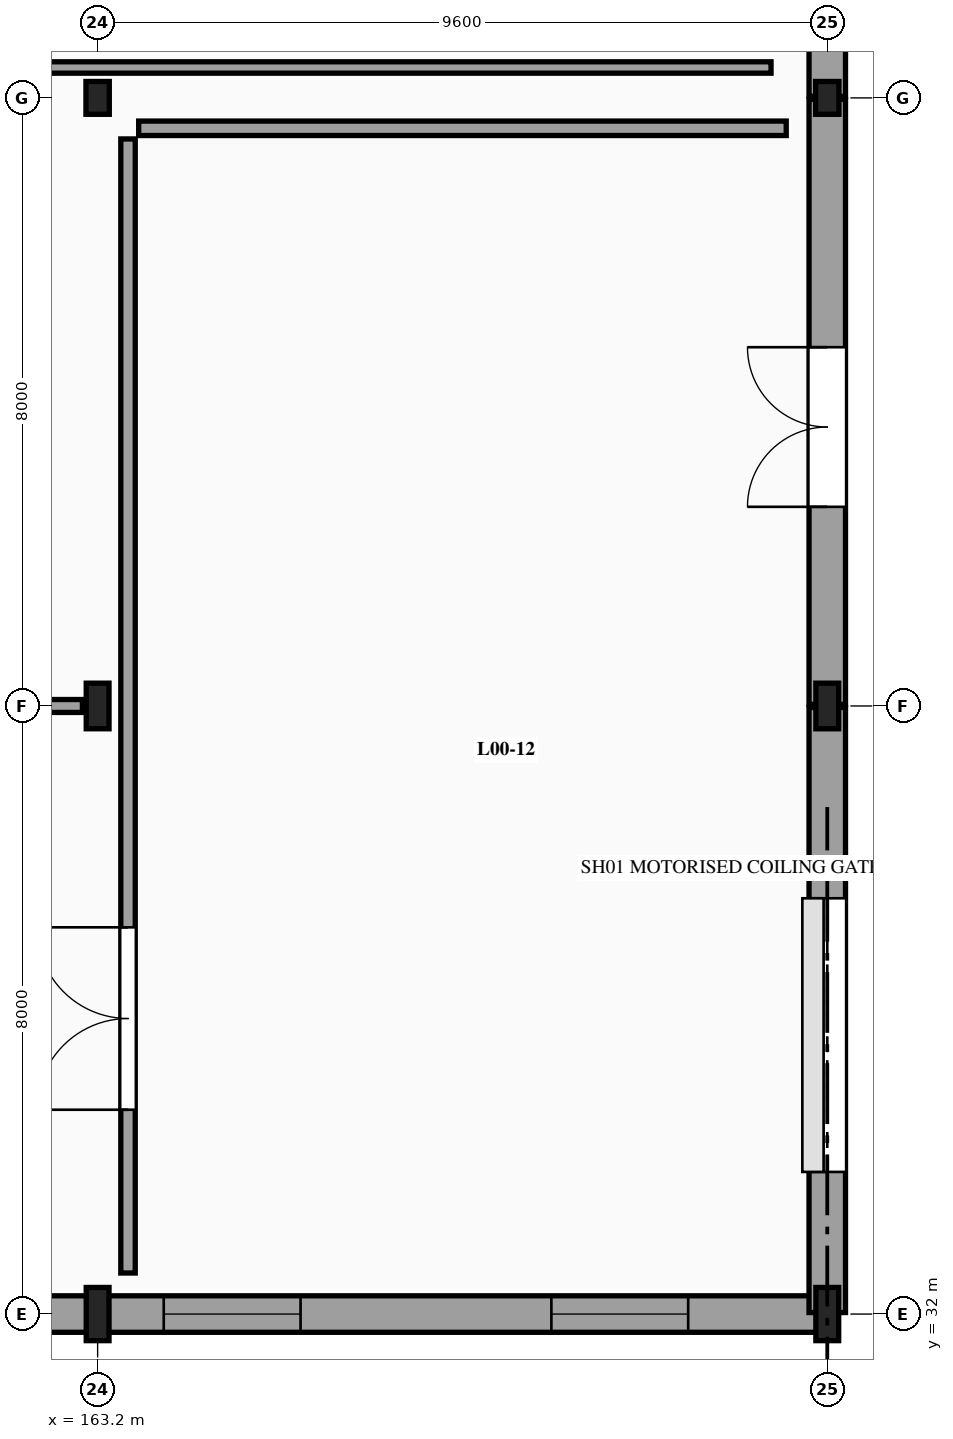
"""IFC4 building model, lengths in metres.
Left out: names, types, materials, properties, quantities, classifications, styles, units other than length and angle.
Written with IfcOpenShell. Run it as: python <this file> out.ifc"""

import sys

from ifc_helpers import new_model, si_unit, direction, frame, frame_2d, origin, origin_2d, place, context, subcontext, project, spatial, rectangle, i_section, extrude, element, fill, save


model = new_model("IFC4")
c1 = context("Model", 3, precision=1e-05, world=origin(), true_north=direction((0.0, 1.0)))
c2 = subcontext(c1, "Body", "Model", "MODEL_VIEW")
j1 = project(units=[si_unit("LENGTHUNIT", "METRE"), si_unit("PLANEANGLEUNIT", "RADIAN")], contexts=[c1])
p1 = place(None, origin())
s1 = spatial("IfcSite", under=j1, at=p1, CompositionType="ELEMENT")
p2 = place(p1, origin())
s2 = spatial("IfcBuilding", under=s1, at=p2, CompositionType="ELEMENT")
p3 = place(p2, origin())
s3 = spatial("IfcBuildingStorey", under=s2, at=p3, CompositionType="ELEMENT", Elevation=0.0)
p4 = place(p3, frame((163.2, 32.0, -0.28), z_axis=(0.0, 0.0, 1.0), x_axis=(1.0, 0.0, 0.0)))
e1 = element("IfcColumn", 1, at=p4, inside=s3, PredefinedType="COLUMN", context=c2, shape_type="SweptSolid", body=[
    extrude(i_section(OverallWidth=0.3, OverallDepth=0.7, WebThickness=0.017, FlangeThickness=0.032, FilletRadius=0.027, at=origin_2d()), origin(), (0.0, 0.0, 1.0), 4.52),
])
p5 = place(p3, frame((163.2, 40.0, -0.28), z_axis=(0.0, 0.0, 1.0), x_axis=(1.0, 0.0, 0.0)))
e2 = element("IfcColumn", 2, at=p5, inside=s3, PredefinedType="COLUMN", context=c2, shape_type="SweptSolid", body=[
    extrude(i_section(OverallWidth=0.3, OverallDepth=0.6, WebThickness=0.015, FlangeThickness=0.03, FilletRadius=0.027, at=origin_2d()), origin(), (0.0, 0.0, 1.0), 4.52),
])
p6 = place(p3, frame((163.2, 48.0, -0.28), z_axis=(0.0, 0.0, 1.0), x_axis=(1.0, 0.0, 0.0)))
e3 = element("IfcColumn", 3, at=p6, inside=s3, PredefinedType="COLUMN", context=c2, shape_type="SweptSolid", body=[
    extrude(i_section(OverallWidth=0.307, OverallDepth=0.432, WebThickness=0.021, FlangeThickness=0.04, FilletRadius=0.027, at=origin_2d()), origin(), (0.0, 0.0, 1.0), 4.52),
])
p7 = place(p3, frame((172.8, 32.0, -0.28), z_axis=(0.0, 0.0, 1.0), x_axis=(1.0, 0.0, 0.0)))
e4 = element("IfcColumn", 4, at=p7, inside=s3, PredefinedType="COLUMN", context=c2, shape_type="SweptSolid", body=[
    extrude(i_section(OverallWidth=0.3, OverallDepth=0.7, WebThickness=0.017, FlangeThickness=0.032, FilletRadius=0.027, at=origin_2d()), origin(), (0.0, 0.0, 1.0), 4.52),
])
p8 = place(p3, frame((172.8, 40.0, -0.28), z_axis=(0.0, 0.0, 1.0), x_axis=(1.0, 0.0, 0.0)))
e5 = element("IfcColumn", 5, at=p8, inside=s3, PredefinedType="COLUMN", context=c2, shape_type="SweptSolid", body=[
    extrude(i_section(OverallWidth=0.3, OverallDepth=0.6, WebThickness=0.015, FlangeThickness=0.03, FilletRadius=0.027, at=origin_2d()), origin(), (0.0, 0.0, 1.0), 4.52),
])
p9 = place(p3, frame((172.8, 48.0, -0.28), z_axis=(0.0, 0.0, 1.0), x_axis=(1.0, 0.0, 0.0)))
e6 = element("IfcColumn", 6, at=p9, inside=s3, PredefinedType="COLUMN", context=c2, shape_type="SweptSolid", body=[
    extrude(i_section(OverallWidth=0.307, OverallDepth=0.432, WebThickness=0.021, FlangeThickness=0.04, FilletRadius=0.027, at=origin_2d()), origin(), (0.0, 0.0, 1.0), 4.52),
])
p10 = place(p3, frame((153.62, 32.0, 0.0), z_axis=(0.0, 0.0, 1.0), x_axis=(1.0, 0.0, 0.0)))
e7 = element("IfcWall", 7, at=p10, inside=s3, PredefinedType="SOLIDWALL", context=c2, shape_type="SweptSolid", body=[
    extrude(rectangle(XDim=9.56, YDim=0.48, at=frame_2d((4.78, 0.0))), origin(), (0.0, 0.0, 1.0), 3.56),
])
p11 = place(p10, frame((0.85, 0.0, 0.85)))
e8 = element("IfcOpeningElement", 8, at=p11, cuts=e7, PredefinedType="OPENING", context=c2, shape_type="SweptSolid", body=[
    extrude(rectangle(XDim=1.6, YDim=2.0, at=frame_2d((0.8, 1.0))), frame((0.0, 0.25, 0.0), z_axis=(0.0, -1.0, 0.0), x_axis=(1.0, 0.0, 0.0)), (0.0, 0.0, 1.0), 0.5),
])
p12 = place(p10, frame((5.95, 0.0, 0.85)))
e9 = element("IfcOpeningElement", 9, at=p12, cuts=e7, PredefinedType="OPENING", context=c2, shape_type="SweptSolid", body=[
    extrude(rectangle(XDim=1.6, YDim=2.0, at=frame_2d((0.8, 1.0))), frame((0.0, 0.25, 0.0), z_axis=(0.0, -1.0, 0.0), x_axis=(1.0, 0.0, 0.0)), (0.0, 0.0, 1.0), 0.5),
])
p13 = place(p3, frame((163.22, 32.0, 0.0), z_axis=(0.0, 0.0, 1.0), x_axis=(1.0, 0.0, 0.0)))
e10 = element("IfcWall", 10, at=p13, inside=s3, PredefinedType="SOLIDWALL", context=c2, shape_type="SweptSolid", body=[
    extrude(rectangle(XDim=9.56, YDim=0.48, at=frame_2d((4.78, 0.0))), origin(), (0.0, 0.0, 1.0), 3.56),
])
p14 = place(p13, frame((0.85, 0.0, 0.85)))
e11 = element("IfcOpeningElement", 11, at=p14, cuts=e10, PredefinedType="OPENING", context=c2, shape_type="SweptSolid", body=[
    extrude(rectangle(XDim=1.8, YDim=2.4, at=frame_2d((0.9, 1.2))), frame((0.0, 0.25, 0.0), z_axis=(0.0, -1.0, 0.0), x_axis=(1.0, 0.0, 0.0)), (0.0, 0.0, 1.0), 0.5),
])
p15 = place(p13, frame((5.95, 0.0, 0.85)))
e12 = element("IfcOpeningElement", 12, at=p15, cuts=e10, PredefinedType="OPENING", context=c2, shape_type="SweptSolid", body=[
    extrude(rectangle(XDim=1.8, YDim=2.4, at=frame_2d((0.9, 1.2))), frame((0.0, 0.25, 0.0), z_axis=(0.0, -1.0, 0.0), x_axis=(1.0, 0.0, 0.0)), (0.0, 0.0, 1.0), 0.5),
])
p16 = place(p3, frame((172.8, 32.02, 0.0), z_axis=(0.0, 0.0, 1.0), x_axis=(0.0, 1.0, 0.0)))
e13 = element("IfcWall", 13, at=p16, inside=s3, PredefinedType="SOLIDWALL", context=c2, shape_type="SweptSolid", body=[
    extrude(rectangle(XDim=7.96, YDim=0.48, at=frame_2d((3.98, 0.0))), origin(), (0.0, 0.0, 1.0), 3.56),
])
p17 = place(p16, frame((1.85, 0.0, 0.0)))
e14 = element("IfcOpeningElement", 14, at=p17, cuts=e13, PredefinedType="OPENING", context=c2, shape_type="SweptSolid", body=[
    extrude(rectangle(XDim=3.6, YDim=3.2, at=frame_2d((1.8, 1.6))), frame((0.0, 0.25, 0.0), z_axis=(0.0, -1.0, 0.0), x_axis=(1.0, 0.0, 0.0)), (0.0, 0.0, 1.0), 0.5),
])
p18 = place(p3, frame((172.8, 40.02, 0.0), z_axis=(0.0, 0.0, 1.0), x_axis=(0.0, 1.0, 0.0)))
e15 = element("IfcWall", 15, at=p18, inside=s3, PredefinedType="SOLIDWALL", context=c2, shape_type="SweptSolid", body=[
    extrude(rectangle(XDim=7.96, YDim=0.48, at=frame_2d((3.98, 0.0))), origin(), (0.0, 0.0, 1.0), 3.56),
])
p19 = place(p18, frame((2.6, 0.0, 0.0)))
e16 = element("IfcOpeningElement", 16, at=p19, cuts=e15, PredefinedType="OPENING", context=c2, shape_type="SweptSolid", body=[
    extrude(rectangle(XDim=2.1, YDim=2.4, at=frame_2d((1.05, 1.2))), frame((0.0, 0.25, 0.0), z_axis=(0.0, -1.0, 0.0), x_axis=(1.0, 0.0, 0.0)), (0.0, 0.0, 1.0), 0.5),
])
p20 = place(p3, frame((172.8, 48.02, 0.0), z_axis=(0.0, 0.0, 1.0), x_axis=(0.0, 1.0, 0.0)))
e17 = element("IfcWall", 17, at=p20, inside=s3, PredefinedType="SOLIDWALL", context=c2, shape_type="SweptSolid", body=[
    extrude(rectangle(XDim=7.96, YDim=0.48, at=frame_2d((3.98, 0.0))), origin(), (0.0, 0.0, 1.0), 3.56),
])
p21 = place(p20, frame((4.9, 0.0, 0.9)))
e18 = element("IfcOpeningElement", 18, at=p21, cuts=e17, PredefinedType="OPENING", context=c2, shape_type="SweptSolid", body=[
    extrude(rectangle(XDim=1.2, YDim=1.8, at=frame_2d((0.6, 0.9))), frame((0.0, 0.25, 0.0), z_axis=(0.0, -1.0, 0.0), x_axis=(1.0, 0.0, 0.0)), (0.0, 0.0, 1.0), 0.5),
])
p22 = place(p3, frame((144.0, 40.0, 0.0), z_axis=(0.0, 0.0, 1.0), x_axis=(1.0, 0.0, 0.0)))
e19 = element("IfcWall", 19, at=p22, inside=s3, PredefinedType="SOLIDWALL", context=c2, shape_type="SweptSolid", body=[
    extrude(rectangle(XDim=19.0, YDim=0.17, at=frame_2d((9.5, 0.0))), origin(), (0.0, 0.0, 1.0), 3.6),
])
p23 = place(p22, frame((3.8, 0.0, 0.0)))
e20 = element("IfcOpeningElement", 20, at=p23, cuts=e19, PredefinedType="OPENING", context=c2, shape_type="SweptSolid", body=[
    extrude(rectangle(XDim=1.6, YDim=2.25, at=frame_2d((0.8, 1.125))), frame((0.0, 0.095, 0.0), z_axis=(0.0, -1.0, 0.0), x_axis=(1.0, 0.0, 0.0)), (0.0, 0.0, 1.0), 0.19),
])
p24 = place(p3, frame((163.74, 47.6, 0.0), z_axis=(0.0, 0.0, 1.0), x_axis=(1.0, 0.0, 0.0)))
e21 = element("IfcWall", 21, at=p24, inside=s3, PredefinedType="SOLIDWALL", context=c2, shape_type="SweptSolid", body=[
    extrude(rectangle(XDim=8.52, YDim=0.19, at=frame_2d((4.26, 0.0))), origin(), (0.0, 0.0, 1.0), 3.6),
])
p25 = place(p3, frame((163.6, 32.54, 0.0), z_axis=(0.0, 0.0, 1.0), x_axis=(0.0, 1.0, 0.0)))
e22 = element("IfcWall", 22, at=p25, inside=s3, PredefinedType="SOLIDWALL", context=c2, shape_type="SweptSolid", body=[
    extrude(rectangle(XDim=14.92, YDim=0.19, at=frame_2d((7.46, 0.0))), origin(), (0.0, 0.0, 1.0), 3.6),
])
p26 = place(p25, frame((2.148, 0.0, 0.0)))
e23 = element("IfcOpeningElement", 23, at=p26, cuts=e22, PredefinedType="OPENING", context=c2, shape_type="SweptSolid", body=[
    extrude(rectangle(XDim=2.4, YDim=2.8, at=frame_2d((1.2, 1.4))), frame((0.0, 0.105, 0.0), z_axis=(0.0, -1.0, 0.0), x_axis=(1.0, 0.0, 0.0)), (0.0, 0.0, 1.0), 0.21),
])
p27 = place(p3, frame((146.74, 48.4, 0.0), z_axis=(0.0, 0.0, 1.0), x_axis=(1.0, 0.0, 0.0)))
e24 = element("IfcWall", 24, at=p27, inside=s3, PredefinedType="PARTITIONING", context=c2, shape_type="SweptSolid", body=[
    extrude(rectangle(XDim=25.32, YDim=0.15, at=frame_2d((12.66, 0.0))), origin(), (0.0, 0.0, 1.0), 3.6),
])
p28 = place(p14, origin())
e25 = element("IfcWindow", 25, at=p28, inside=s3, PartitioningType="SINGLE_PANEL", PredefinedType="WINDOW", context=c2, shape_type="SweptSolid", body=[
    extrude(rectangle(XDim=1.8, YDim=2.4, at=frame_2d((0.9, 1.2))), frame((0.0, 0.03, 0.0), z_axis=(0.0, -1.0, 0.0), x_axis=(1.0, 0.0, 0.0)), (0.0, 0.0, 1.0), 0.06),
])
fill(e11, e25)
p29 = place(p15, origin())
e26 = element("IfcWindow", 26, at=p29, inside=s3, PartitioningType="SINGLE_PANEL", PredefinedType="WINDOW", context=c2, shape_type="SweptSolid", body=[
    extrude(rectangle(XDim=1.8, YDim=2.4, at=frame_2d((0.9, 1.2))), frame((0.0, 0.03, 0.0), z_axis=(0.0, -1.0, 0.0), x_axis=(1.0, 0.0, 0.0)), (0.0, 0.0, 1.0), 0.06),
])
fill(e12, e26)
p30 = place(p17, origin())
e27 = element("IfcDoor", 27, at=p30, inside=s3, OperationType="ROLLINGUP", PredefinedType="GATE", context=c2, shape_type="SweptSolid", body=[
    extrude(rectangle(XDim=3.6, YDim=3.2, at=frame_2d((1.8, 1.6))), frame((0.0, 0.025, 0.0), z_axis=(0.0, -1.0, 0.0), x_axis=(1.0, 0.0, 0.0)), (0.0, 0.0, 1.0), 0.05),
])
fill(e14, e27)
p31 = place(p19, frame((2.1, 0.0, 0.0), z_axis=(0.0, 0.0, 1.0), x_axis=(-1.0, 0.0, 0.0)))
e28 = element("IfcDoor", 28, at=p31, inside=s3, OperationType="DOUBLE_DOOR_SINGLE_SWING", PredefinedType="DOOR", context=c2, shape_type="SweptSolid", body=[
    extrude(rectangle(XDim=2.1, YDim=2.4, at=frame_2d((1.05, 1.2))), frame((0.0, 0.025, 0.0), z_axis=(0.0, -1.0, 0.0), x_axis=(1.0, 0.0, 0.0)), (0.0, 0.0, 1.0), 0.05),
])
fill(e16, e28)
p32 = place(p26, origin())
e29 = element("IfcDoor", 29, at=p32, inside=s3, OperationType="DOUBLE_DOOR_SINGLE_SWING", PredefinedType="DOOR", context=c2, shape_type="SweptSolid", body=[
    extrude(rectangle(XDim=2.4, YDim=2.8, at=frame_2d((1.2, 1.4))), frame((0.0, 0.025, 0.0), z_axis=(0.0, -1.0, 0.0), x_axis=(1.0, 0.0, 0.0)), (0.0, 0.0, 1.0), 0.05),
])
fill(e23, e29)
save(model, sys.argv[1])
